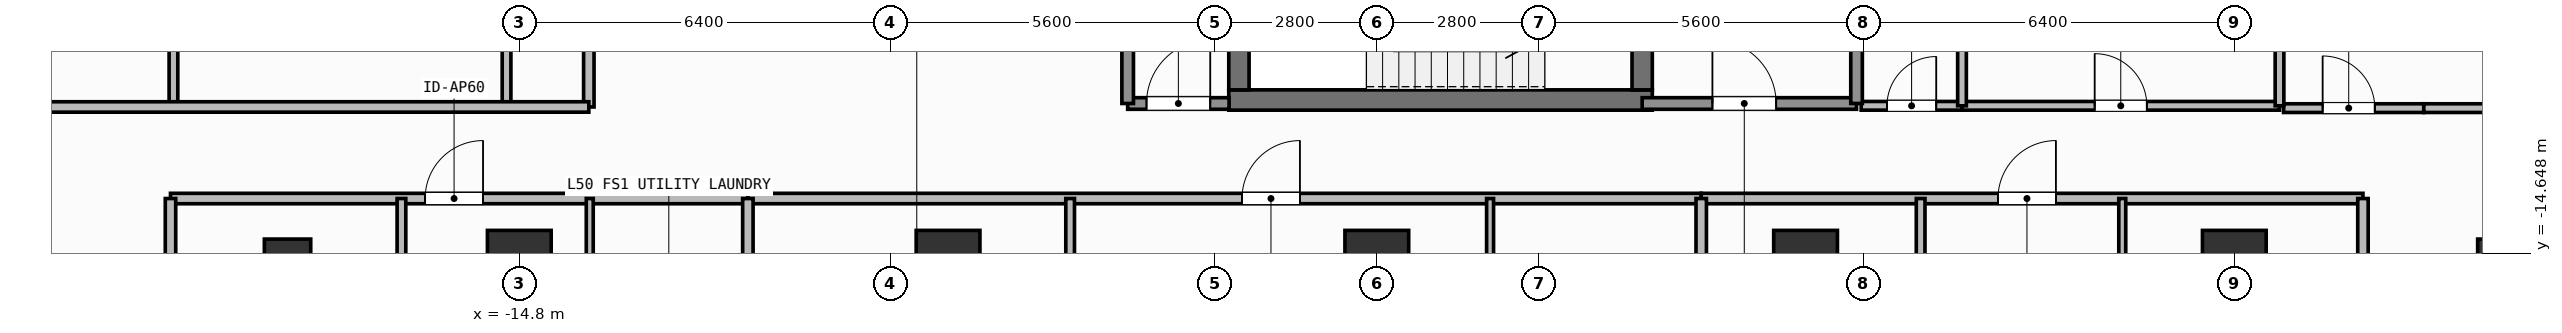
"""IFC4 building model, lengths in metres.
Left out: names, types, materials, properties, quantities, classifications, styles, units other than length and angle.
Written with IfcOpenShell. Run it as: python <this file> out.ifc"""

import sys

from ifc_helpers import new_model, si_unit, direction, frame, frame_2d, origin, origin_2d, place, context, subcontext, project, spatial, rectangle, hollow_rectangle, extrude, element, fill, save


model = new_model("IFC4")
c1 = context("Model", 3, precision=1e-05, world=origin(), true_north=direction((0.0, 1.0)))
c2 = subcontext(c1, "Body", "Model", "MODEL_VIEW")
j1 = project(units=[si_unit("LENGTHUNIT", "METRE"), si_unit("PLANEANGLEUNIT", "RADIAN")], contexts=[c1])
p1 = place(None, origin())
s1 = spatial("IfcSite", under=j1, at=p1, CompositionType="ELEMENT")
p2 = place(p1, origin())
s2 = spatial("IfcBuilding", under=s1, at=p2, CompositionType="ELEMENT")
p3 = place(p2, frame((0.0, 0.0, 203.1)))
s3 = spatial("IfcBuildingStorey", under=s2, at=p3, CompositionType="ELEMENT", Elevation=203.1)
p4 = place(p3, frame((-2.555, -12.0, 0.0), z_axis=(0.0, 0.0, 1.0), x_axis=(1.0, 0.0, 0.0)))
e1 = element("IfcWall", 1, at=p4, inside=s3, PredefinedType="SHEAR", context=c2, shape_type="SweptSolid", body=[
    extrude(rectangle(XDim=7.31, YDim=0.35, at=frame_2d((3.655, 0.0))), origin(), (0.0, 0.0, 1.0), 3.9),
])
p5 = place(p3, frame((-2.38, -11.825, 0.0), z_axis=(0.0, 0.0, 1.0), x_axis=(0.0, 1.0, 0.0)))
e2 = element("IfcWall", 2, at=p5, inside=s3, PredefinedType="SHEAR", context=c2, shape_type="SweptSolid", body=[
    extrude(rectangle(XDim=2.925, YDim=0.35, at=frame_2d((1.462, 0.0))), origin(), (0.0, 0.0, 1.0), 3.9),
])
p6 = place(p3, frame((4.58, -8.9, 0.0), z_axis=(0.0, 0.0, 1.0), x_axis=(0.0, -1.0, 0.0)))
e3 = element("IfcWall", 3, at=p6, inside=s3, PredefinedType="SHEAR", context=c2, shape_type="SweptSolid", body=[
    extrude(rectangle(XDim=2.925, YDim=0.35, at=frame_2d((1.462, 0.0))), origin(), (0.0, 0.0, 1.0), 3.9),
])
p7 = place(p6, frame((0.913, 0.0, 0.0)))
e4 = element("IfcOpeningElement", 4, at=p7, cuts=e3, PredefinedType="OPENING", context=c2, shape_type="SweptSolid", body=[
    extrude(rectangle(XDim=1.1, YDim=2.15, at=frame_2d((0.55, 1.075))), frame((0.0, 0.185, 0.0), z_axis=(0.0, -1.0, 0.0), x_axis=(1.0, 0.0, 0.0)), (0.0, 0.0, 1.0), 0.37),
])
for number, where, z_axis, x_axis in (
    (5, (-14.8, -14.8, 0.0), (0.0, 0.0, 1.0), (1.0, 0.0, 0.0)),
    (6, (-7.4, -14.8, 0.0), (0.0, 0.0, 1.0), (1.0, 0.0, 0.0)),
    (7, (0.0, -14.8, 0.0), (0.0, 0.0, 1.0), (1.0, 0.0, 0.0)),
    (8, (7.4, -14.8, 0.0), (0.0, 0.0, 1.0), (1.0, 0.0, 0.0)),
    (9, (14.8, -14.8, 0.0), (0.0, 0.0, 1.0), (1.0, 0.0, 0.0)),
):
    element("IfcColumn", number, at=place(p3, frame(where, z_axis=z_axis, x_axis=x_axis)), inside=s3, PredefinedType="COLUMN", context=c2, shape_type="SweptSolid", body=[
        extrude(rectangle(XDim=1.1, YDim=1.1, at=origin_2d()), origin(), (0.0, 0.0, 1.0), 3.9),
    ])
for number, where, z_axis, x_axis in (
    (10, (-18.8, -14.8, 0.0), (0.0, 0.0, 1.0), (1.0, 0.0, 0.0)),
    (11, (19.4, -14.8, 0.0), (0.0, 0.0, 1.0), (1.0, 0.0, 0.0)),
):
    element("IfcColumn", number, at=place(p3, frame(where, z_axis=z_axis, x_axis=x_axis)), inside=s3, PredefinedType="COLUMN", context=c2, shape_type="SweptSolid", body=[
        extrude(hollow_rectangle(XDim=0.8, YDim=0.8, WallThickness=0.036, at=origin_2d()), origin(), (0.0, 0.0, 1.0), 3.9),
    ])
p8 = place(p3, frame((4.58, -12.06, 0.0), z_axis=(0.0, 0.0, 1.0), x_axis=(1.0, 0.0, 0.0)))
e12 = element("IfcWall", 12, at=p8, inside=s3, PredefinedType="SOLIDWALL", context=c2, shape_type="SweptSolid", body=[
    extrude(rectangle(XDim=3.7, YDim=0.2, at=frame_2d((1.85, 0.0))), origin(), (0.0, 0.0, 1.0), 3.68),
])
p9 = place(p8, frame((1.212, 0.0, 0.0)))
e13 = element("IfcOpeningElement", 13, at=p9, cuts=e12, PredefinedType="OPENING", context=c2, shape_type="SweptSolid", body=[
    extrude(rectangle(XDim=1.1, YDim=2.15, at=frame_2d((0.55, 1.075))), frame((0.0, 0.11, 0.0), z_axis=(0.0, -1.0, 0.0), x_axis=(1.0, 0.0, 0.0)), (0.0, 0.0, 1.0), 0.22),
])
p10 = place(p3, frame((-4.3, -12.06, 0.0), z_axis=(0.0, 0.0, 1.0), x_axis=(1.0, 0.0, 0.0)))
e14 = element("IfcWall", 14, at=p10, inside=s3, PredefinedType="SOLIDWALL", context=c2, shape_type="SweptSolid", body=[
    extrude(rectangle(XDim=1.75, YDim=0.2, at=frame_2d((0.875, 0.0))), origin(), (0.0, 0.0, 1.0), 3.68),
])
p11 = place(p10, frame((0.325, 0.0, 0.0)))
e15 = element("IfcOpeningElement", 15, at=p11, cuts=e14, PredefinedType="OPENING", context=c2, shape_type="SweptSolid", body=[
    extrude(rectangle(XDim=1.1, YDim=2.15, at=frame_2d((0.55, 1.075))), frame((0.0, 0.11, 0.0), z_axis=(0.0, -1.0, 0.0), x_axis=(1.0, 0.0, 0.0)), (0.0, 0.0, 1.0), 0.22),
])
p12 = place(p3, frame((8.36, -12.1, 0.0), z_axis=(0.0, 0.0, 1.0), x_axis=(1.0, 0.0, 0.0)))
e16 = element("IfcWall", 16, at=p12, inside=s3, PredefinedType="PARTITIONING", context=c2, shape_type="SweptSolid", body=[
    extrude(rectangle(XDim=1.74, YDim=0.15, at=frame_2d((0.87, 0.0))), origin(), (0.0, 0.0, 1.0), 3.68),
])
p13 = place(p12, frame((0.445, 0.0, 0.0)))
e17 = element("IfcOpeningElement", 17, at=p13, cuts=e16, PredefinedType="OPENING", context=c2, shape_type="SweptSolid", body=[
    extrude(rectangle(XDim=0.85, YDim=2.1, at=frame_2d((0.425, 1.05))), frame((0.0, 0.085, 0.0), z_axis=(0.0, -1.0, 0.0), x_axis=(1.0, 0.0, 0.0)), (0.0, 0.0, 1.0), 0.17),
])
p14 = place(p3, frame((10.1, -12.1, 0.0), z_axis=(0.0, 0.0, 1.0), x_axis=(1.0, 0.0, 0.0)))
e18 = element("IfcWall", 18, at=p14, inside=s3, PredefinedType="PARTITIONING", context=c2, shape_type="SweptSolid", body=[
    extrude(rectangle(XDim=5.48, YDim=0.15, at=frame_2d((2.74, 0.0))), origin(), (0.0, 0.0, 1.0), 3.68),
])
p15 = place(p14, frame((2.29, 0.0, 0.0)))
e19 = element("IfcOpeningElement", 19, at=p15, cuts=e18, PredefinedType="OPENING", context=c2, shape_type="SweptSolid", body=[
    extrude(rectangle(XDim=0.9, YDim=2.1, at=frame_2d((0.45, 1.05))), frame((0.0, 0.085, 0.0), z_axis=(0.0, -1.0, 0.0), x_axis=(1.0, 0.0, 0.0)), (0.0, 0.0, 1.0), 0.17),
])
p16 = place(p3, frame((-20.82, -13.7, 0.0), z_axis=(0.0, 0.0, 1.0), x_axis=(1.0, 0.0, 0.0)))
e20 = element("IfcWall", 20, at=p16, inside=s3, PredefinedType="PARTITIONING", context=c2, shape_type="SweptSolid", body=[
    extrude(rectangle(XDim=9.965, YDim=0.18, at=frame_2d((4.982, 0.0))), origin(), (0.0, 0.0, 1.0), 3.68),
])
p17 = place(p16, frame((4.394, 0.0, 0.0)))
e21 = element("IfcOpeningElement", 21, at=p17, cuts=e20, PredefinedType="OPENING", context=c2, shape_type="SweptSolid", body=[
    extrude(rectangle(XDim=1.0, YDim=2.2, at=frame_2d((0.5, 1.1))), frame((0.0, 0.1, 0.0), z_axis=(0.0, -1.0, 0.0), x_axis=(1.0, 0.0, 0.0)), (0.0, 0.0, 1.0), 0.2),
])
p18 = place(p3, frame((-16.834, -24.39, 0.0), z_axis=(0.0, 0.0, 1.0), x_axis=(0.0, 1.0, 0.0)))
e22 = element("IfcWall", 22, at=p18, inside=s3, PredefinedType="PARTITIONING", context=c2, shape_type="SweptSolid", body=[
    extrude(rectangle(XDim=10.69, YDim=0.15, at=frame_2d((5.345, 0.0))), origin(), (0.0, 0.0, 1.0), 3.68),
])
p19 = place(p18, frame((4.83, 0.0, 0.0)))
e23 = element("IfcOpeningElement", 23, at=p19, cuts=e22, PredefinedType="OPENING", context=c2, shape_type="SweptSolid", body=[
    extrude(rectangle(XDim=0.85, YDim=2.1, at=frame_2d((0.425, 1.05))), frame((0.0, 0.085, 0.0), z_axis=(0.0, -1.0, 0.0), x_axis=(1.0, 0.0, 0.0)), (0.0, 0.0, 1.0), 0.17),
])
p20 = place(p3, frame((-13.584, -21.055, 0.0), z_axis=(0.0, 0.0, 1.0), x_axis=(0.0, 1.0, 0.0)))
e24 = element("IfcWall", 24, at=p20, inside=s3, PredefinedType="PARTITIONING", context=c2, shape_type="SweptSolid", body=[
    extrude(rectangle(XDim=7.355, YDim=0.12, at=frame_2d((3.677, 0.0))), origin(), (0.0, 0.0, 1.0), 3.68),
])
p21 = place(p20, frame((2.634, 0.0, 0.0)))
e25 = element("IfcOpeningElement", 25, at=p21, cuts=e24, PredefinedType="OPENING", context=c2, shape_type="SweptSolid", body=[
    extrude(rectangle(XDim=0.85, YDim=2.1, at=frame_2d((0.425, 1.05))), frame((0.0, 0.07, 0.0), z_axis=(0.0, -1.0, 0.0), x_axis=(1.0, 0.0, 0.0)), (0.0, 0.0, 1.0), 0.14),
])
p22 = place(p3, frame((-10.855, -13.7, 0.0), z_axis=(0.0, 0.0, 1.0), x_axis=(1.0, 0.0, 0.0)))
e26 = element("IfcWall", 26, at=p22, inside=s3, PredefinedType="PARTITIONING", context=c2, shape_type="SweptSolid", body=[
    extrude(rectangle(XDim=16.454, YDim=0.18, at=frame_2d((8.227, 0.0))), origin(), (0.0, 0.0, 1.0), 3.68),
])
p23 = place(p22, frame((8.528, 0.0, 0.0)))
e27 = element("IfcOpeningElement", 27, at=p23, cuts=e26, PredefinedType="OPENING", context=c2, shape_type="SweptSolid", body=[
    extrude(rectangle(XDim=1.0, YDim=2.2, at=frame_2d((0.5, 1.1))), frame((0.0, 0.1, 0.0), z_axis=(0.0, -1.0, 0.0), x_axis=(1.0, 0.0, 0.0)), (0.0, 0.0, 1.0), 0.2),
])
p24 = place(p3, frame((-5.293, -18.277, 0.0), z_axis=(0.0, 0.0, 1.0), x_axis=(0.0, 1.0, 0.0)))
e28 = element("IfcWall", 28, at=p24, inside=s3, PredefinedType="PARTITIONING", context=c2, shape_type="SweptSolid", body=[
    extrude(rectangle(XDim=4.577, YDim=0.15, at=frame_2d((2.289, 0.0))), origin(), (0.0, 0.0, 1.0), 3.68),
])
p25 = place(p24, frame((1.953, 0.0, 0.0)))
e29 = element("IfcOpeningElement", 29, at=p25, cuts=e28, PredefinedType="OPENING", context=c2, shape_type="SweptSolid", body=[
    extrude(rectangle(XDim=0.85, YDim=2.1, at=frame_2d((0.425, 1.05))), frame((0.0, 0.085, 0.0), z_axis=(0.0, -1.0, 0.0), x_axis=(1.0, 0.0, 0.0)), (0.0, 0.0, 1.0), 0.17),
])
p26 = place(p3, frame((1.955, -21.183, 0.0), z_axis=(0.0, 0.0, 1.0), x_axis=(0.0, 1.0, 0.0)))
e30 = element("IfcWall", 30, at=p26, inside=s3, PredefinedType="PARTITIONING", context=c2, shape_type="SweptSolid", body=[
    extrude(rectangle(XDim=7.483, YDim=0.12, at=frame_2d((3.742, 0.0))), origin(), (0.0, 0.0, 1.0), 3.68),
])
p27 = place(p26, frame((3.316, 0.0, 0.0)))
e31 = element("IfcOpeningElement", 31, at=p27, cuts=e30, PredefinedType="OPENING", context=c2, shape_type="SweptSolid", body=[
    extrude(rectangle(XDim=0.85, YDim=2.1, at=frame_2d((0.425, 1.05))), frame((0.0, 0.07, 0.0), z_axis=(0.0, -1.0, 0.0), x_axis=(1.0, 0.0, 0.0)), (0.0, 0.0, 1.0), 0.14),
])
p28 = place(p3, frame((5.599, -13.7, 0.0), z_axis=(0.0, 0.0, 1.0), x_axis=(1.0, 0.0, 0.0)))
e32 = element("IfcWall", 32, at=p28, inside=s3, PredefinedType="PARTITIONING", context=c2, shape_type="SweptSolid", body=[
    extrude(rectangle(XDim=11.421, YDim=0.18, at=frame_2d((5.71, 0.0))), origin(), (0.0, 0.0, 1.0), 3.68),
])
p29 = place(p28, frame((5.122, 0.0, 0.0)))
e33 = element("IfcOpeningElement", 33, at=p29, cuts=e32, PredefinedType="OPENING", context=c2, shape_type="SweptSolid", body=[
    extrude(rectangle(XDim=1.0, YDim=2.2, at=frame_2d((0.5, 1.1))), frame((0.0, 0.1, 0.0), z_axis=(0.0, -1.0, 0.0), x_axis=(1.0, 0.0, 0.0)), (0.0, 0.0, 1.0), 0.2),
])
p30 = place(p3, frame((9.386, -24.39, 0.0), z_axis=(0.0, 0.0, 1.0), x_axis=(0.0, 1.0, 0.0)))
e34 = element("IfcWall", 34, at=p30, inside=s3, PredefinedType="PARTITIONING", context=c2, shape_type="SweptSolid", body=[
    extrude(rectangle(XDim=10.69, YDim=0.15, at=frame_2d((5.345, 0.0))), origin(), (0.0, 0.0, 1.0), 3.68),
])
p31 = place(p30, frame((4.83, 0.0, 0.0)))
e35 = element("IfcOpeningElement", 35, at=p31, cuts=e34, PredefinedType="OPENING", context=c2, shape_type="SweptSolid", body=[
    extrude(rectangle(XDim=0.85, YDim=2.1, at=frame_2d((0.425, 1.05))), frame((0.0, 0.085, 0.0), z_axis=(0.0, -1.0, 0.0), x_axis=(1.0, 0.0, 0.0)), (0.0, 0.0, 1.0), 0.17),
])
p32 = place(p3, frame((12.866, -18.19, 0.0), z_axis=(0.0, 0.0, 1.0), x_axis=(0.0, 1.0, 0.0)))
e36 = element("IfcWall", 36, at=p32, inside=s3, PredefinedType="PARTITIONING", context=c2, shape_type="SweptSolid", body=[
    extrude(rectangle(XDim=4.49, YDim=0.12, at=frame_2d((2.245, 0.0))), origin(), (0.0, 0.0, 1.0), 3.68),
])
p33 = place(p32, frame((1.907, 0.0, 0.0)))
e37 = element("IfcOpeningElement", 37, at=p33, cuts=e36, PredefinedType="OPENING", context=c2, shape_type="SweptSolid", body=[
    extrude(rectangle(XDim=0.85, YDim=2.1, at=frame_2d((0.425, 1.05))), frame((0.0, 0.07, 0.0), z_axis=(0.0, -1.0, 0.0), x_axis=(1.0, 0.0, 0.0)), (0.0, 0.0, 1.0), 0.14),
])
p34 = place(p3, frame((-13.6, -12.12, 0.0), z_axis=(0.0, 0.0, 1.0), x_axis=(0.0, 1.0, 0.0)))
e38 = element("IfcWall", 38, at=p34, inside=s3, PredefinedType="PARTITIONING", context=c2, shape_type="SweptSolid", body=[
    extrude(rectangle(XDim=23.55, YDim=0.18, at=frame_2d((11.775, 0.0))), origin(), (0.0, 0.0, 1.0), 3.68),
])
p35 = place(p34, frame((11.454, 0.0, 0.0)))
e39 = element("IfcOpeningElement", 39, at=p35, cuts=e38, PredefinedType="OPENING", context=c2, shape_type="SweptSolid", body=[
    extrude(rectangle(XDim=1.0, YDim=2.2, at=frame_2d((0.5, 1.1))), frame((0.0, 0.1, 0.0), z_axis=(0.0, -1.0, 0.0), x_axis=(1.0, 0.0, 0.0)), (0.0, 0.0, 1.0), 0.2),
])
p36 = place(p3, frame((-15.02, -12.12, 0.0), z_axis=(0.0, 0.0, 1.0), x_axis=(0.0, 1.0, 0.0)))
e40 = element("IfcWall", 40, at=p36, inside=s3, PredefinedType="PARTITIONING", context=c2, shape_type="SweptSolid", body=[
    extrude(rectangle(XDim=6.711, YDim=0.15, at=frame_2d((3.355, 0.0))), origin(), (0.0, 0.0, 1.0), 3.182),
])
p37 = place(p36, frame((2.841, 0.0, 0.0)))
e41 = element("IfcOpeningElement", 41, at=p37, cuts=e40, PredefinedType="OPENING", context=c2, shape_type="SweptSolid", body=[
    extrude(rectangle(XDim=0.85, YDim=2.1, at=frame_2d((0.425, 1.05))), frame((0.0, 0.085, 0.0), z_axis=(0.0, -1.0, 0.0), x_axis=(1.0, 0.0, 0.0)), (0.0, 0.0, 1.0), 0.17),
])
p38 = place(p3, frame((15.65, -12.14, 0.0), z_axis=(0.0, 0.0, 1.0), x_axis=(1.0, 0.0, 0.0)))
e42 = element("IfcWall", 42, at=p38, inside=s3, PredefinedType="PARTITIONING", context=c2, shape_type="SweptSolid", body=[
    extrude(rectangle(XDim=2.42, YDim=0.15, at=frame_2d((1.21, 0.0))), origin(), (0.0, 0.0, 1.0), 3.68),
])
p39 = place(p38, frame((0.674, 0.0, 0.0)))
e43 = element("IfcOpeningElement", 43, at=p39, cuts=e42, PredefinedType="OPENING", context=c2, shape_type="SweptSolid", body=[
    extrude(rectangle(XDim=0.9, YDim=2.1, at=frame_2d((0.45, 1.05))), frame((0.0, 0.085, 0.0), z_axis=(0.0, -1.0, 0.0), x_axis=(1.0, 0.0, 0.0)), (0.0, 0.0, 1.0), 0.17),
])
for number, where, z_axis, x_axis in (
    (44, (8.28, -12.06, 0.0), (0.0, 0.0, 1.0), (0.0, 1.0, 0.0)),
    (45, (-4.3, -12.06, 0.0), (0.0, 0.0, 1.0), (0.0, 1.0, 0.0)),
):
    element("IfcWall", number, at=place(p3, frame(where, z_axis=z_axis, x_axis=x_axis)), inside=s3, PredefinedType="SOLIDWALL", context=c2, shape_type="SweptSolid", body=[
        extrude(rectangle(XDim=3.26, YDim=0.2, at=frame_2d((1.63, 0.0))), origin(), (0.0, 0.0, 1.0), 3.68),
    ])
p40 = place(p3, frame((10.1, -12.1, 0.0), z_axis=(0.0, 0.0, 1.0), x_axis=(0.0, 1.0, 0.0)))
e46 = element("IfcWall", 46, at=p40, inside=s3, PredefinedType="PARTITIONING", context=c2, shape_type="SweptSolid", body=[
    extrude(rectangle(XDim=2.35, YDim=0.15, at=frame_2d((1.175, 0.0))), origin(), (0.0, 0.0, 1.0), 3.68),
])
p41 = place(p3, frame((15.58, -12.1, 0.0), z_axis=(0.0, 0.0, 1.0), x_axis=(0.0, 1.0, 0.0)))
e47 = element("IfcWall", 47, at=p41, inside=s3, PredefinedType="PARTITIONING", context=c2, shape_type="SweptSolid", body=[
    extrude(rectangle(XDim=6.25, YDim=0.15, at=frame_2d((3.125, 0.0))), origin(), (0.0, 0.0, 1.0), 3.68),
])
for number, where, z_axis, x_axis in (
    (48, (-10.855, -28.63, 0.0), (0.0, 0.0, 1.0), (0.0, 1.0, 0.0)),
    (49, (5.599, -28.63, 0.0), (0.0, 0.0, 1.0), (0.0, 1.0, 0.0)),
):
    element("IfcWall", number, at=place(p3, frame(where, z_axis=z_axis, x_axis=x_axis)), inside=s3, PredefinedType="PARTITIONING", context=c2, shape_type="SweptSolid", body=[
        extrude(rectangle(XDim=14.93, YDim=0.18, at=frame_2d((7.465, 0.0))), origin(), (0.0, 0.0, 1.0), 3.68),
    ])
for number, where, z_axis, x_axis in (
    (50, (-20.82, -27.51, 0.0), (0.0, 0.0, 1.0), (0.0, 1.0, 0.0)),
    (51, (17.02, -27.51, 0.0), (0.0, 0.0, 1.0), (0.0, 1.0, 0.0)),
):
    element("IfcWall", number, at=place(p3, frame(where, z_axis=z_axis, x_axis=x_axis)), inside=s3, PredefinedType="PARTITIONING", context=c2, shape_type="SweptSolid", body=[
        extrude(rectangle(XDim=13.81, YDim=0.18, at=frame_2d((6.905, 0.0))), origin(), (0.0, 0.0, 1.0), 3.68),
    ])
p42 = place(p3, frame((-20.769, -12.12, 0.0), z_axis=(0.0, 0.0, 1.0), x_axis=(0.0, 1.0, 0.0)))
e52 = element("IfcWall", 52, at=p42, inside=s3, PredefinedType="PARTITIONING", context=c2, shape_type="SweptSolid", body=[
    extrude(rectangle(XDim=6.711, YDim=0.15, at=frame_2d((3.355, 0.0))), origin(), (0.0, 0.0, 1.0), 3.68),
])
p43 = place(p3, frame((-24.13, -12.12, 0.0), z_axis=(0.0, 0.0, 1.0), x_axis=(1.0, 0.0, 0.0)))
e53 = element("IfcWall", 53, at=p43, inside=s3, PredefinedType="PARTITIONING", context=c2, shape_type="SweptSolid", body=[
    extrude(rectangle(XDim=10.53, YDim=0.18, at=frame_2d((5.265, 0.0))), origin(), (0.0, 0.0, 1.0), 3.68),
])
p44 = place(p3, frame((18.07, -12.14, 0.0), z_axis=(0.0, 0.0, 1.0), x_axis=(1.0, 0.0, 0.0)))
e54 = element("IfcWall", 54, at=p44, inside=s3, PredefinedType="PARTITIONING", context=c2, shape_type="SweptSolid", body=[
    extrude(rectangle(XDim=2.26, YDim=0.15, at=frame_2d((1.13, 0.0))), origin(), (0.0, 0.0, 1.0), 3.68),
])
p45 = place(p9, origin())
e55 = element("IfcDoor", 55, at=p45, inside=s3, OperationType="SINGLE_SWING_LEFT", PredefinedType="DOOR", context=c2, shape_type="SweptSolid", body=[
    extrude(rectangle(XDim=1.1, YDim=2.15, at=frame_2d((0.55, 1.075))), frame((0.0, 0.025, 0.0), z_axis=(0.0, -1.0, 0.0), x_axis=(1.0, 0.0, 0.0)), (0.0, 0.0, 1.0), 0.05),
])
fill(e13, e55)
p46 = place(p11, origin())
e56 = element("IfcDoor", 56, at=p46, inside=s3, OperationType="SINGLE_SWING_RIGHT", PredefinedType="DOOR", context=c2, shape_type="SweptSolid", body=[
    extrude(rectangle(XDim=1.1, YDim=2.15, at=frame_2d((0.55, 1.075))), frame((0.0, 0.025, 0.0), z_axis=(0.0, -1.0, 0.0), x_axis=(1.0, 0.0, 0.0)), (0.0, 0.0, 1.0), 0.05),
])
fill(e15, e56)
p47 = place(p13, origin())
e57 = element("IfcDoor", 57, at=p47, inside=s3, OperationType="SINGLE_SWING_RIGHT", PredefinedType="DOOR", context=c2, shape_type="SweptSolid", body=[
    extrude(rectangle(XDim=0.85, YDim=2.1, at=frame_2d((0.425, 1.05))), frame((0.0, 0.025, 0.0), z_axis=(0.0, -1.0, 0.0), x_axis=(1.0, 0.0, 0.0)), (0.0, 0.0, 1.0), 0.05),
])
fill(e17, e57)
p48 = place(p15, origin())
e58 = element("IfcDoor", 58, at=p48, inside=s3, OperationType="SINGLE_SWING_LEFT", PredefinedType="DOOR", context=c2, shape_type="SweptSolid", body=[
    extrude(rectangle(XDim=0.9, YDim=2.1, at=frame_2d((0.45, 1.05))), frame((0.0, 0.025, 0.0), z_axis=(0.0, -1.0, 0.0), x_axis=(1.0, 0.0, 0.0)), (0.0, 0.0, 1.0), 0.05),
])
fill(e19, e58)
p49 = place(p17, origin())
e59 = element("IfcDoor", 59, at=p49, inside=s3, OperationType="SINGLE_SWING_RIGHT", PredefinedType="DOOR", context=c2, shape_type="SweptSolid", body=[
    extrude(rectangle(XDim=1.0, YDim=2.2, at=frame_2d((0.5, 1.1))), frame((0.0, 0.025, 0.0), z_axis=(0.0, -1.0, 0.0), x_axis=(1.0, 0.0, 0.0)), (0.0, 0.0, 1.0), 0.05),
])
fill(e21, e59)
p50 = place(p23, origin())
e60 = element("IfcDoor", 60, at=p50, inside=s3, OperationType="SINGLE_SWING_RIGHT", PredefinedType="DOOR", context=c2, shape_type="SweptSolid", body=[
    extrude(rectangle(XDim=1.0, YDim=2.2, at=frame_2d((0.5, 1.1))), frame((0.0, 0.025, 0.0), z_axis=(0.0, -1.0, 0.0), x_axis=(1.0, 0.0, 0.0)), (0.0, 0.0, 1.0), 0.05),
])
fill(e27, e60)
p51 = place(p29, origin())
e61 = element("IfcDoor", 61, at=p51, inside=s3, OperationType="SINGLE_SWING_RIGHT", PredefinedType="DOOR", context=c2, shape_type="SweptSolid", body=[
    extrude(rectangle(XDim=1.0, YDim=2.2, at=frame_2d((0.5, 1.1))), frame((0.0, 0.025, 0.0), z_axis=(0.0, -1.0, 0.0), x_axis=(1.0, 0.0, 0.0)), (0.0, 0.0, 1.0), 0.05),
])
fill(e33, e61)
p52 = place(p39, origin())
e62 = element("IfcDoor", 62, at=p52, inside=s3, OperationType="SINGLE_SWING_LEFT", PredefinedType="DOOR", context=c2, shape_type="SweptSolid", body=[
    extrude(rectangle(XDim=0.9, YDim=2.1, at=frame_2d((0.45, 1.05))), frame((0.0, 0.025, 0.0), z_axis=(0.0, -1.0, 0.0), x_axis=(1.0, 0.0, 0.0)), (0.0, 0.0, 1.0), 0.05),
])
fill(e43, e62)
save(model, sys.argv[1])
